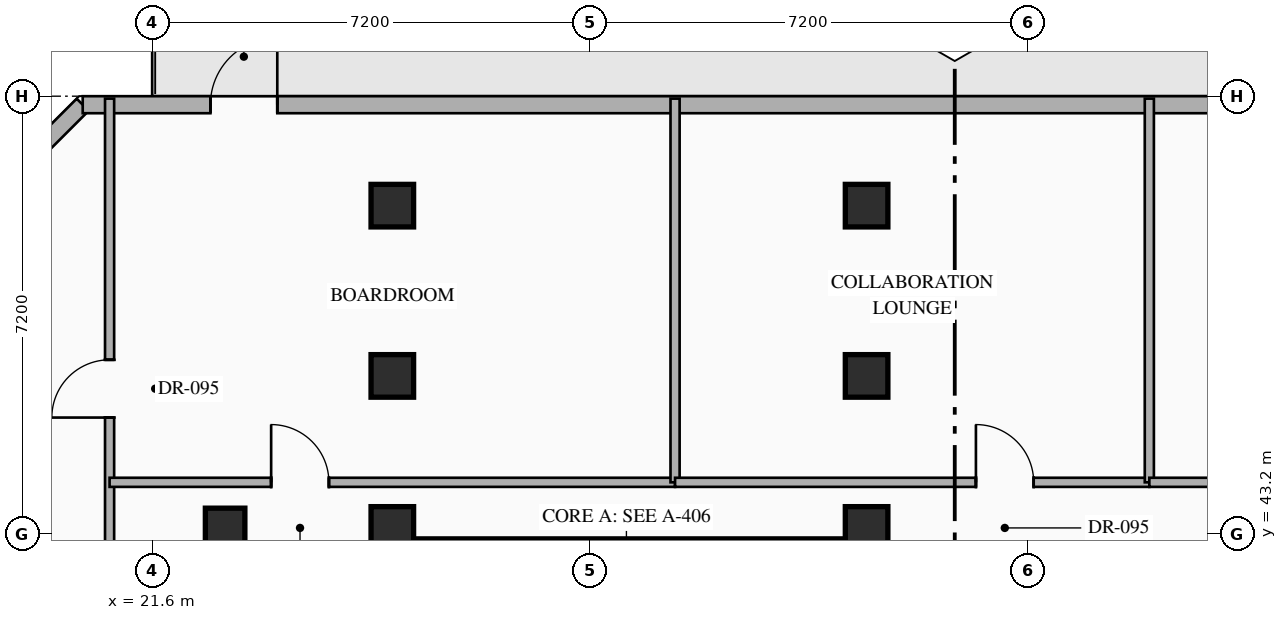
"""IFC4 building model, lengths in metres.
Left out: names, types, materials, properties, quantities, classifications, styles, units other than length and angle.
Written with IfcOpenShell. Run it as: python <this file> out.ifc"""

import sys

from ifc_helpers import new_model, si_unit, direction, frame, frame_2d, origin, origin_2d, place, context, subcontext, project, spatial, rectangle, hollow_rectangle, extrude, element, fill, save


model = new_model("IFC4")
c1 = context("Model", 3, precision=1e-05, world=origin(), true_north=direction((0.0, 1.0)))
c2 = subcontext(c1, "Body", "Model", "MODEL_VIEW")
j1 = project(units=[si_unit("LENGTHUNIT", "METRE"), si_unit("PLANEANGLEUNIT", "RADIAN")], contexts=[c1])
p1 = place(None, origin())
s1 = spatial("IfcSite", under=j1, at=p1, CompositionType="ELEMENT")
p2 = place(p1, origin())
s2 = spatial("IfcBuilding", under=s1, at=p2, CompositionType="ELEMENT")
p3 = place(p2, frame((0.0, 0.0, 234.75)))
s3 = spatial("IfcBuildingStorey", under=s2, at=p3, CompositionType="ELEMENT", Elevation=234.75)
p4 = place(p3, frame((25.77, 42.895, 0.0), z_axis=(0.0, 0.0, 1.0), x_axis=(1.0, 0.0, 0.0)))
e1 = element("IfcWall", 1, at=p4, inside=s3, PredefinedType="SHEAR", context=c2, shape_type="SweptSolid", body=[
    extrude(rectangle(XDim=7.48, YDim=0.45, at=frame_2d((3.74, 0.0))), origin(), (0.0, 0.0, 1.0), 4.8),
])
for number, where, z_axis, x_axis in (
    (2, (25.55, 43.3, 0.0), (0.0, 0.0, 1.0), (1.0, 0.0, 0.0)),
    (3, (33.35, 43.3, 0.0), (0.0, 0.0, 1.0), (1.0, 0.0, 0.0)),
    (4, (25.55, 45.8, 0.0), (0.0, 0.0, 1.0), (1.0, 0.0, 0.0)),
    (5, (33.35, 45.8, 0.0), (0.0, 0.0, 1.0), (1.0, 0.0, 0.0)),
    (6, (25.55, 48.6, 0.0), (0.0, 0.0, 1.0), (1.0, 0.0, 0.0)),
    (7, (33.35, 48.6, 0.0), (0.0, 0.0, 1.0), (1.0, 0.0, 0.0)),
):
    element("IfcColumn", number, at=place(p3, frame(where, z_axis=z_axis, x_axis=x_axis)), inside=s3, PredefinedType="COLUMN", context=c2, shape_type="SweptSolid", body=[
        extrude(hollow_rectangle(XDim=0.7, YDim=0.7, WallThickness=0.028, at=origin_2d()), origin(), (0.0, 0.0, 1.0), 4.8),
    ])
p5 = place(p3, frame((22.8, 43.3, 0.0), z_axis=(0.0, 0.0, 1.0), x_axis=(1.0, 0.0, 0.0)))
e8 = element("IfcColumn", 8, at=p5, inside=s3, PredefinedType="COLUMN", context=c2, shape_type="SweptSolid", body=[
    extrude(hollow_rectangle(XDim=0.65, YDim=0.65, WallThickness=0.025, at=origin_2d()), origin(), (0.0, 0.0, 1.0), 4.8),
])
p6 = place(p3, frame((18.14, 47.942, 0.0), z_axis=(0.0, 0.0, 1.0), x_axis=(0.707106781187, 0.707106781187, 0.0)))
e9 = element("IfcWall", 9, at=p6, inside=s3, PredefinedType="STANDARD", context=c2, shape_type="SweptSolid", body=[
    extrude(rectangle(XDim=3.278, YDim=0.28, at=frame_2d((1.639, 0.0))), origin(), (0.0, 0.0, 1.0), 4.55),
])
p7 = place(p3, frame((20.458, 50.26, 0.0), z_axis=(0.0, 0.0, 1.0), x_axis=(1.0, 0.0, 0.0)))
e10 = element("IfcWall", 10, at=p7, inside=s3, PredefinedType="STANDARD", context=c2, shape_type="SweptSolid", body=[
    extrude(rectangle(XDim=22.084, YDim=0.28, at=frame_2d((11.042, 0.0))), origin(), (0.0, 0.0, 1.0), 4.55),
])
p8 = place(p7, frame((2.1, 0.0, 0.0)))
e11 = element("IfcOpeningElement", 11, at=p8, cuts=e10, PredefinedType="OPENING", context=c2, shape_type="SweptSolid", body=[
    extrude(rectangle(XDim=1.1, YDim=2.2, at=frame_2d((0.55, 1.1))), frame((0.0, 0.15, 0.0), z_axis=(0.0, -1.0, 0.0), x_axis=(1.0, 0.0, 0.0)), (0.0, 0.0, 1.0), 0.3),
])
p9 = place(p3, frame((20.9, 35.6, 0.0), z_axis=(0.0, 0.0, 1.0), x_axis=(0.0, 1.0, 0.0)))
e12 = element("IfcWall", 12, at=p9, inside=s3, PredefinedType="PARTITIONING", context=c2, shape_type="SweptSolid", body=[
    extrude(rectangle(XDim=14.76, YDim=0.15, at=frame_2d((7.38, 0.0))), origin(), (0.0, 0.0, 1.0), 4.55),
])
p10 = place(p9, frame((9.515, 0.0, 0.0)))
e13 = element("IfcOpeningElement", 13, at=p10, cuts=e12, PredefinedType="OPENING", context=c2, shape_type="SweptSolid", body=[
    extrude(rectangle(XDim=0.95, YDim=2.15, at=frame_2d((0.475, 1.075))), frame((0.0, 0.085, 0.0), z_axis=(0.0, -1.0, 0.0), x_axis=(1.0, 0.0, 0.0)), (0.0, 0.0, 1.0), 0.17),
])
p11 = place(p3, frame((20.9, 44.05, 0.0), z_axis=(0.0, 0.0, 1.0), x_axis=(1.0, 0.0, 0.0)))
e14 = element("IfcWall", 14, at=p11, inside=s3, PredefinedType="PARTITIONING", context=c2, shape_type="SweptSolid", body=[
    extrude(rectangle(XDim=9.3, YDim=0.15, at=frame_2d((4.65, 0.0))), origin(), (0.0, 0.0, 1.0), 4.55),
])
p12 = place(p11, frame((2.657, 0.0, 0.0)))
e15 = element("IfcOpeningElement", 15, at=p12, cuts=e14, PredefinedType="OPENING", context=c2, shape_type="SweptSolid", body=[
    extrude(rectangle(XDim=0.95, YDim=2.15, at=frame_2d((0.475, 1.075))), frame((0.0, 0.085, 0.0), z_axis=(0.0, -1.0, 0.0), x_axis=(1.0, 0.0, 0.0)), (0.0, 0.0, 1.0), 0.17),
])
p13 = place(p3, frame((30.2, 44.05, 0.0), z_axis=(0.0, 0.0, 1.0), x_axis=(0.0, 1.0, 0.0)))
e16 = element("IfcWall", 16, at=p13, inside=s3, PredefinedType="PARTITIONING", context=c2, shape_type="SweptSolid", body=[
    extrude(rectangle(XDim=6.31, YDim=0.15, at=frame_2d((3.155, 0.0))), origin(), (0.0, 0.0, 1.0), 4.55),
])
p14 = place(p3, frame((30.2, 44.05, 0.0), z_axis=(0.0, 0.0, 1.0), x_axis=(1.0, 0.0, 0.0)))
e17 = element("IfcWall", 17, at=p14, inside=s3, PredefinedType="PARTITIONING", context=c2, shape_type="SweptSolid", body=[
    extrude(rectangle(XDim=7.8, YDim=0.15, at=frame_2d((3.9, 0.0))), origin(), (0.0, 0.0, 1.0), 4.55),
])
p15 = place(p14, frame((4.948, 0.0, 0.0)))
e18 = element("IfcOpeningElement", 18, at=p15, cuts=e17, PredefinedType="OPENING", context=c2, shape_type="SweptSolid", body=[
    extrude(rectangle(XDim=0.95, YDim=2.15, at=frame_2d((0.475, 1.075))), frame((0.0, 0.085, 0.0), z_axis=(0.0, -1.0, 0.0), x_axis=(1.0, 0.0, 0.0)), (0.0, 0.0, 1.0), 0.17),
])
p16 = place(p3, frame((38.0, 44.05, 0.0), z_axis=(0.0, 0.0, 1.0), x_axis=(0.0, 1.0, 0.0)))
e19 = element("IfcWall", 19, at=p16, inside=s3, PredefinedType="PARTITIONING", context=c2, shape_type="SweptSolid", body=[
    extrude(rectangle(XDim=6.31, YDim=0.15, at=frame_2d((3.155, 0.0))), origin(), (0.0, 0.0, 1.0), 4.55),
])
p17 = place(p3, frame((38.0, 44.05, 0.0), z_axis=(0.0, 0.0, 1.0), x_axis=(1.0, 0.0, 0.0)))
e20 = element("IfcWall", 20, at=p17, inside=s3, PredefinedType="PARTITIONING", context=c2, shape_type="SweptSolid", body=[
    extrude(rectangle(XDim=6.96, YDim=0.15, at=frame_2d((3.48, 0.0))), origin(), (0.0, 0.0, 1.0), 4.55),
])
p18 = place(p17, frame((3.005, 0.0, 0.0)))
e21 = element("IfcOpeningElement", 21, at=p18, cuts=e20, PredefinedType="OPENING", context=c2, shape_type="SweptSolid", body=[
    extrude(rectangle(XDim=0.95, YDim=2.15, at=frame_2d((0.475, 1.075))), frame((0.0, 0.085, 0.0), z_axis=(0.0, -1.0, 0.0), x_axis=(1.0, 0.0, 0.0)), (0.0, 0.0, 1.0), 0.17),
])
p19 = place(p8, origin())
e22 = element("IfcDoor", 22, at=p19, inside=s3, OperationType="SINGLE_SWING_RIGHT", PredefinedType="DOOR", context=c2, shape_type="SweptSolid", body=[
    extrude(rectangle(XDim=1.1, YDim=2.2, at=frame_2d((0.55, 1.1))), frame((0.0, 0.025, 0.0), z_axis=(0.0, -1.0, 0.0), x_axis=(1.0, 0.0, 0.0)), (0.0, 0.0, 1.0), 0.05),
])
fill(e11, e22)
p20 = place(p10, origin())
e23 = element("IfcDoor", 23, at=p20, inside=s3, OperationType="SINGLE_SWING_LEFT", PredefinedType="DOOR", context=c2, shape_type="SweptSolid", body=[
    extrude(rectangle(XDim=0.95, YDim=2.15, at=frame_2d((0.475, 1.075))), frame((0.0, 0.025, 0.0), z_axis=(0.0, -1.0, 0.0), x_axis=(1.0, 0.0, 0.0)), (0.0, 0.0, 1.0), 0.05),
])
fill(e13, e23)
p21 = place(p12, origin())
e24 = element("IfcDoor", 24, at=p21, inside=s3, OperationType="SINGLE_SWING_LEFT", PredefinedType="DOOR", context=c2, shape_type="SweptSolid", body=[
    extrude(rectangle(XDim=0.95, YDim=2.15, at=frame_2d((0.475, 1.075))), frame((0.0, 0.025, 0.0), z_axis=(0.0, -1.0, 0.0), x_axis=(1.0, 0.0, 0.0)), (0.0, 0.0, 1.0), 0.05),
])
fill(e15, e24)
p22 = place(p15, origin())
e25 = element("IfcDoor", 25, at=p22, inside=s3, OperationType="SINGLE_SWING_LEFT", PredefinedType="DOOR", context=c2, shape_type="SweptSolid", body=[
    extrude(rectangle(XDim=0.95, YDim=2.15, at=frame_2d((0.475, 1.075))), frame((0.0, 0.025, 0.0), z_axis=(0.0, -1.0, 0.0), x_axis=(1.0, 0.0, 0.0)), (0.0, 0.0, 1.0), 0.05),
])
fill(e18, e25)
save(model, sys.argv[1])
